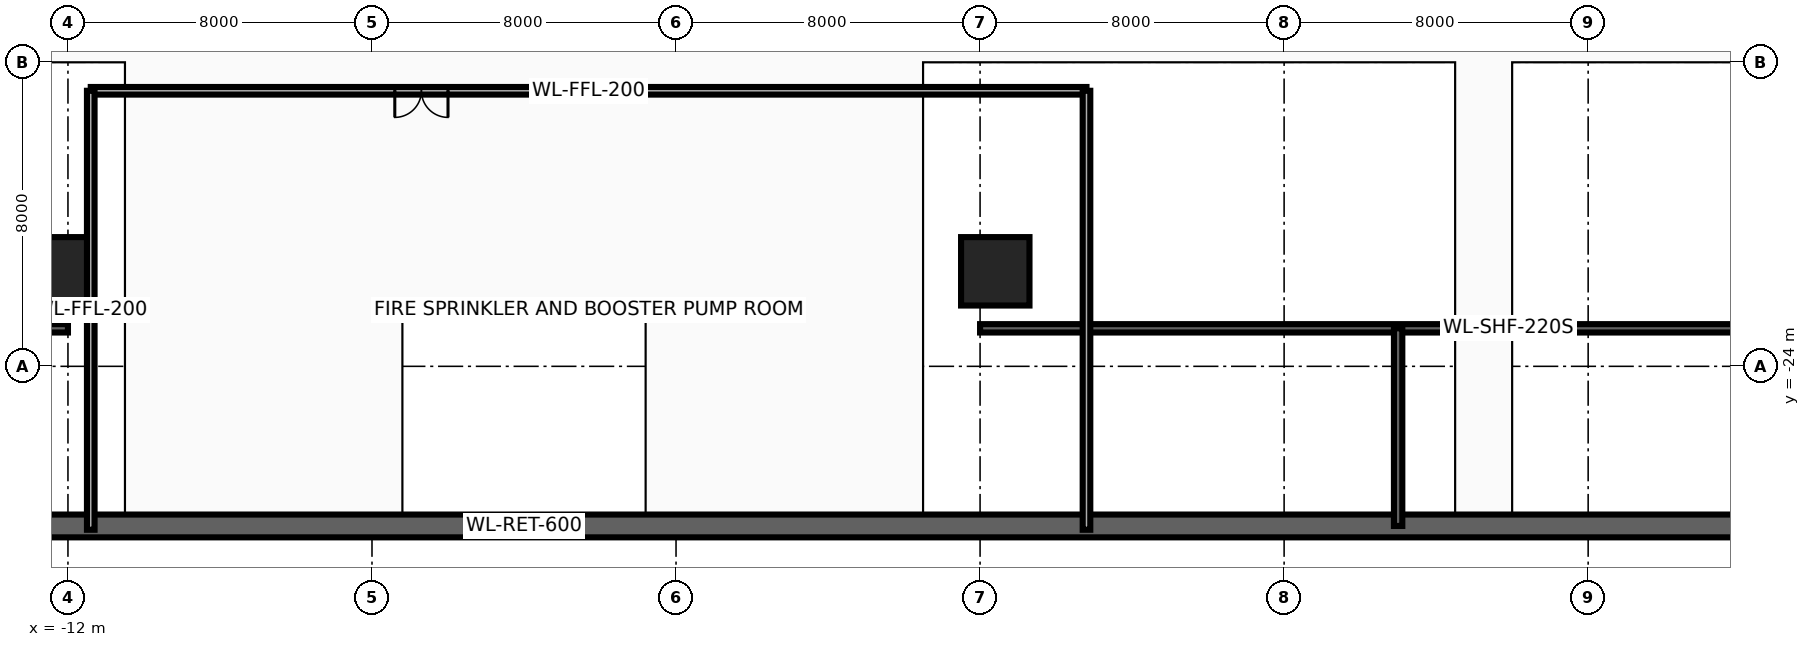
"""IFC4 building model, lengths in metres.
Left out: names, types, materials, properties, quantities, classifications, styles, units other than length and angle.
Written with IfcOpenShell. Run it as: python <this file> out.ifc"""

import sys

from ifc_helpers import new_model, si_unit, direction, frame, frame_2d, origin, origin_2d, place, context, subcontext, project, spatial, rectangle, extrude, source, transform, mapped, element, fill, save


model = new_model("IFC4")
c1 = context("Model", 3, precision=1e-05, world=origin(), true_north=direction((0.0, 1.0)))
c2 = subcontext(c1, "Body", "Model", "MODEL_VIEW")
j1 = project(units=[si_unit("LENGTHUNIT", "METRE"), si_unit("PLANEANGLEUNIT", "RADIAN")], contexts=[c1])
p1 = place(None, origin())
s1 = spatial("IfcSite", under=j1, at=p1, CompositionType="ELEMENT")
p2 = place(p1, origin())
s2 = spatial("IfcBuilding", under=s1, at=p2, CompositionType="ELEMENT")
p3 = place(p2, frame((0.0, 0.0, -9.6)))
s3 = spatial("IfcBuildingStorey", under=s2, at=p3, CompositionType="ELEMENT", Elevation=-9.6)
p4 = place(p3, frame((-40.5, -28.2, 0.0), z_axis=(0.0, 0.0, 1.0), x_axis=(1.0, 0.0, 0.0)))
e1 = element("IfcWall", 1, at=p4, inside=s3, PredefinedType="SOLIDWALL", context=c2, shape_type="SweptSolid", body=[
    extrude(rectangle(XDim=81.0, YDim=0.6, at=frame_2d((40.5, 0.0))), origin(), (0.0, 0.0, 1.0), 4.54),
])
for number, where, z_axis, x_axis in (
    (2, (-39.8, -23.0, 0.0), (0.0, 0.0, 1.0), (1.0, 0.0, 0.0)),
    (3, (12.0, -23.0, 0.0), (0.0, 0.0, 1.0), (1.0, 0.0, 0.0)),
):
    element("IfcWall", number, at=place(p3, frame(where, z_axis=z_axis, x_axis=x_axis)), inside=s3, PredefinedType="SHEAR", context=c2, shape_type="SweptSolid", body=[
        extrude(rectangle(XDim=27.8, YDim=0.22, at=frame_2d((13.9, 0.0))), origin(), (0.0, 0.0, 1.0), 4.54),
    ])
p5 = place(p3, frame((23.0, -28.2, 0.0), z_axis=(0.0, 0.0, 1.0), x_axis=(0.0, 1.0, 0.0)))
e4 = element("IfcWall", 4, at=p5, inside=s3, PredefinedType="SHEAR", context=c2, shape_type="SweptSolid", body=[
    extrude(rectangle(XDim=5.2, YDim=0.22, at=frame_2d((2.6, 0.0))), origin(), (0.0, 0.0, 1.0), 4.54),
])
m1 = source(origin(), c2, "Body", "SweptSolid", [
    extrude(rectangle(XDim=1.8, YDim=1.8, at=origin_2d()), origin(), (0.0, 0.0, 1.0), 4.8),
])
for number, where, z_axis, x_axis in (
    (5, (-12.4, -21.5, 0.0), (0.0, 0.0, 1.0), (1.0, 0.0, 0.0)),
    (6, (12.4, -21.5, 0.0), (0.0, 0.0, 1.0), (1.0, 0.0, 0.0)),
):
    element("IfcColumn", number, at=place(p3, frame(where, z_axis=z_axis, x_axis=x_axis)), inside=s3, PredefinedType="COLUMN", context=c2, shape_type="MappedRepresentation", body=[
        mapped(m1, transform((0.0, 0.0, 0.0), x_axis=(1.0, 0.0, 0.0), y_axis=(0.0, 1.0, 0.0), z_axis=(0.0, 0.0, 1.0), scale=1.0)),
    ])
p6 = place(p3, frame((-11.4, -16.75, 0.0), z_axis=(0.0, 0.0, 1.0), x_axis=(1.0, 0.0, 0.0)))
e7 = element("IfcWall", 7, at=p6, inside=s3, PredefinedType="PARTITIONING", context=c2, shape_type="SweptSolid", body=[
    extrude(rectangle(XDim=26.2, YDim=0.2, at=frame_2d((13.1, 0.0))), origin(), (0.0, 0.0, 1.0), 3.577),
])
p7 = place(p6, frame((8.0, 0.0, 0.0)))
e8 = element("IfcOpeningElement", 8, at=p7, cuts=e7, PredefinedType="OPENING", context=c2, shape_type="SweptSolid", body=[
    extrude(rectangle(XDim=1.4, YDim=2.15, at=frame_2d((0.7, 1.075))), frame((0.0, 0.115, 0.0), z_axis=(0.0, -1.0, 0.0), x_axis=(1.0, 0.0, 0.0)), (0.0, 0.0, 1.0), 0.23),
])
for number, where, z_axis, x_axis in (
    (9, (-11.4, -28.3, 0.0), (0.0, 0.0, 1.0), (0.0, 1.0, 0.0)),
    (10, (14.8, -28.3, 0.0), (0.0, 0.0, 1.0), (0.0, 1.0, 0.0)),
):
    element("IfcWall", number, at=place(p3, frame(where, z_axis=z_axis, x_axis=x_axis)), inside=s3, PredefinedType="PARTITIONING", context=c2, shape_type="SweptSolid", body=[
        extrude(rectangle(XDim=11.55, YDim=0.2, at=frame_2d((5.775, 0.0))), origin(), (0.0, 0.0, 1.0), 4.54),
    ])
p8 = place(p7, frame((1.4, 0.0, 0.0), z_axis=(0.0, 0.0, 1.0), x_axis=(-1.0, 0.0, 0.0)))
e11 = element("IfcDoor", 11, at=p8, inside=s3, OperationType="DOUBLE_DOOR_SINGLE_SWING", PredefinedType="DOOR", context=c2, shape_type="SweptSolid", body=[
    extrude(rectangle(XDim=1.4, YDim=2.15, at=frame_2d((0.7, 1.075))), frame((0.0, 0.025, 0.0), z_axis=(0.0, -1.0, 0.0), x_axis=(1.0, 0.0, 0.0)), (0.0, 0.0, 1.0), 0.05),
])
fill(e8, e11)
save(model, sys.argv[1])
